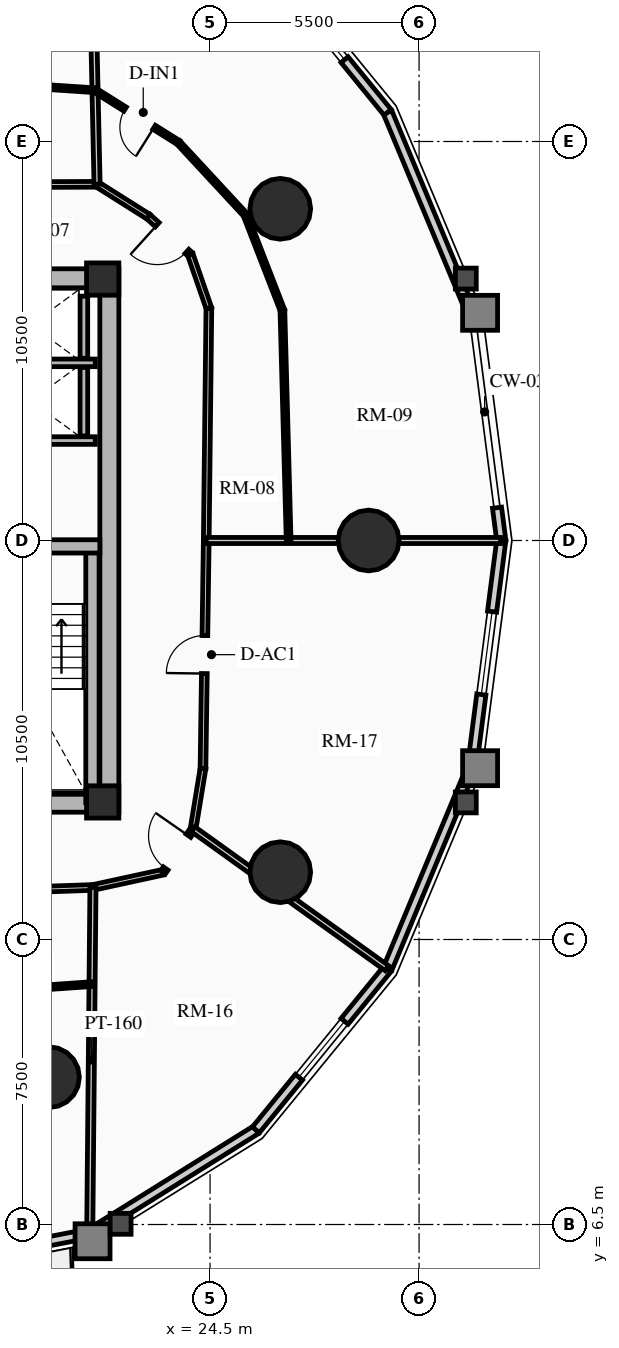
"""IFC4 building model, lengths in metres.
Left out: names, types, materials, properties, quantities, classifications, styles, units other than length and angle.
Written with IfcOpenShell. Run it as: python <this file> out.ifc"""

import sys

from ifc_helpers import new_model, si_unit, direction, frame, frame_2d, origin, origin_2d, place, context, subcontext, project, spatial, rectangle, circle, extrude, source, transform, mapped, element, fill, save


model = new_model("IFC4")
c1 = context("Model", 3, precision=1e-05, world=origin(), true_north=direction((0.0, 1.0)))
c2 = subcontext(c1, "Body", "Model", "MODEL_VIEW")
j1 = project(units=[si_unit("LENGTHUNIT", "METRE"), si_unit("PLANEANGLEUNIT", "RADIAN")], contexts=[c1])
p1 = place(None, origin())
s1 = spatial("IfcSite", under=j1, at=p1, CompositionType="ELEMENT")
p2 = place(p1, origin())
s2 = spatial("IfcBuilding", under=s1, at=p2, CompositionType="ELEMENT")
p3 = place(p2, frame((0.0, 0.0, 56.92)))
s3 = spatial("IfcBuildingStorey", under=s2, at=p3, CompositionType="ELEMENT", Elevation=56.92)
p4 = place(p3, frame((21.85, 17.35, 0.0), z_axis=(0.0, 0.0, 1.0), x_axis=(0.0, 1.0, 0.0)))
e1 = element("IfcWall", 1, at=p4, inside=s3, PredefinedType="SHEAR", context=c2, shape_type="SweptSolid", body=[
    extrude(rectangle(XDim=14.3, YDim=0.5, at=frame_2d((7.15, 0.0))), origin(), (0.0, 0.0, 1.0), 2.91),
])
p5 = place(p3, frame((11.15, 17.6, 0.0), z_axis=(0.0, 0.0, 1.0), x_axis=(1.0, 0.0, 0.0)))
e2 = element("IfcWall", 2, at=p5, inside=s3, PredefinedType="SHEAR", context=c2, shape_type="SweptSolid", body=[
    extrude(rectangle(XDim=10.7, YDim=0.5, at=frame_2d((5.35, 0.0))), origin(), (0.0, 0.0, 1.0), 2.91),
])
m1 = source(origin(), c2, "Body", "SweptSolid", [
    extrude(rectangle(XDim=1.5, YDim=2.02, at=frame_2d((0.75, 1.01))), frame((0.0, 0.26, 0.0), z_axis=(0.0, -1.0, 0.0), x_axis=(1.0, 0.0, 0.0)), (0.0, 0.0, 1.0), 0.52),
])
p6 = place(p5, frame((5.45, 0.0, 0.0)))
e3 = element("IfcOpeningElement", 3, at=p6, cuts=e2, PredefinedType="OPENING", context=c2, shape_type="MappedRepresentation", body=[
    mapped(m1, transform((0.0, 0.0, 0.0), x_axis=(1.0, 0.0, 0.0), y_axis=(0.0, 1.0, 0.0), z_axis=(0.0, 0.0, 1.0), scale=1.0)),
])
p7 = place(p3, frame((11.15, 31.4, 0.0), z_axis=(0.0, 0.0, 1.0), x_axis=(1.0, 0.0, 0.0)))
e4 = element("IfcWall", 4, at=p7, inside=s3, PredefinedType="SHEAR", context=c2, shape_type="SweptSolid", body=[
    extrude(rectangle(XDim=10.7, YDim=0.5, at=frame_2d((5.35, 0.0))), origin(), (0.0, 0.0, 1.0), 2.91),
])
p8 = place(p7, frame((4.6, 0.0, 0.0)))
e5 = element("IfcOpeningElement", 5, at=p8, cuts=e4, PredefinedType="OPENING", context=c2, shape_type="MappedRepresentation", body=[
    mapped(m1, transform((0.0, 0.0, 0.0), x_axis=(1.0, 0.0, 0.0), y_axis=(0.0, 1.0, 0.0), z_axis=(0.0, 0.0, 1.0), scale=1.0)),
])
p9 = place(p3, frame((21.405, 17.6, 0.0), z_axis=(0.0, 0.0, 1.0), x_axis=(0.0, 1.0, 0.0)))
e6 = element("IfcWall", 6, at=p9, inside=s3, PredefinedType="SHEAR", context=c2, shape_type="SweptSolid", body=[
    extrude(rectangle(XDim=6.745, YDim=0.35, at=frame_2d((3.373, 0.0))), origin(), (0.0, 0.0, 1.0), 2.91),
])
p10 = place(p3, frame((18.315, 24.345, 0.0), z_axis=(0.0, 0.0, 1.0), x_axis=(1.0, 0.0, 0.0)))
e7 = element("IfcWall", 7, at=p10, inside=s3, PredefinedType="SHEAR", context=c2, shape_type="SweptSolid", body=[
    extrude(rectangle(XDim=3.285, YDim=0.35, at=frame_2d((1.643, 0.0))), origin(), (0.0, 0.0, 1.0), 2.91),
])
for number, where, z_axis, x_axis in (
    (8, (21.675, 17.62, 0.0), (0.0, 0.0, 1.0), (1.0, 0.0, 0.0)),
    (9, (21.675, 31.38, 0.0), (0.0, 0.0, 1.0), (1.0, 0.0, 0.0)),
):
    element("IfcColumn", number, at=place(p3, frame(where, z_axis=z_axis, x_axis=x_axis)), inside=s3, PredefinedType="COLUMN", context=c2, shape_type="SweptSolid", body=[
        extrude(rectangle(XDim=0.85, YDim=0.85, at=origin_2d()), origin(), (0.0, 0.0, 1.0), 2.91),
    ])
for number, where, z_axis, x_axis in (
    (10, (28.672, 24.5, 0.0), (0.0, 0.0, 1.0), (1.0, 0.0, 0.0)),
    (11, (26.347, 33.229, 0.0), (0.0, 0.0, 1.0), (1.0, 0.0, 0.0)),
    (12, (20.261, 10.377, 0.0), (0.0, 0.0, 1.0), (1.0, 0.0, 0.0)),
    (13, (26.347, 15.771, 0.0), (0.0, 0.0, 1.0), (1.0, 0.0, 0.0)),
):
    element("IfcColumn", number, at=place(p3, frame(where, z_axis=z_axis, x_axis=x_axis)), inside=s3, PredefinedType="USERDEFINED", context=c2, shape_type="SweptSolid", body=[
        extrude(circle(Radius=0.8, at=origin_2d()), origin(), (0.0, 0.0, 1.0), 2.91),
    ])
p11 = place(p3, frame((32.051, 25.363, 0.0), z_axis=(0.0, 0.0, 1.0), x_axis=(0.128523364007, -0.991706481225, 0.0)))
e14 = element("IfcWall", 14, at=p11, inside=s3, PredefinedType="SOLIDWALL", context=c2, shape_type="SweptSolid", body=[
    extrude(rectangle(XDim=0.87, YDim=0.24, at=frame_2d((0.435, 0.0))), origin(), (0.0, 0.0, 1.0), 2.635),
])
p12 = place(p3, frame((29.172, 35.768, 0.0), z_axis=(0.0, 0.0, 1.0), x_axis=(0.384348836956, -0.923187939442, 0.0)))
e15 = element("IfcWall", 15, at=p12, inside=s3, PredefinedType="SOLIDWALL", context=c2, shape_type="SweptSolid", body=[
    extrude(rectangle(XDim=5.789, YDim=0.24, at=frame_2d((2.894, 0.0))), origin(), (0.0, 0.0, 1.0), 2.073),
])
p13 = place(p3, frame((25.707, 40.009, 0.0), z_axis=(0.0, 0.0, 1.0), x_axis=(0.632713287022, -0.77438614168, 0.0)))
e16 = element("IfcWall", 16, at=p13, inside=s3, PredefinedType="SOLIDWALL", context=c2, shape_type="SweptSolid", body=[
    extrude(rectangle(XDim=5.477, YDim=0.24, at=frame_2d((2.738, 0.0))), origin(), (0.0, 0.0, 1.0), 2.073),
])
m2 = source(origin(), c2, "Body", "SweptSolid", [
    extrude(rectangle(XDim=1.9, YDim=1.35, at=frame_2d((0.95, 0.675))), frame((0.0, 0.13, 0.0), z_axis=(0.0, -1.0, 0.0), x_axis=(1.0, 0.0, 0.0)), (0.0, 0.0, 1.0), 0.26),
])
p14 = place(p13, frame((1.788, 0.0, 0.65)))
e17 = element("IfcOpeningElement", 17, at=p14, cuts=e16, PredefinedType="OPENING", context=c2, shape_type="MappedRepresentation", body=[
    mapped(m2, transform((0.0, 0.0, 0.0), x_axis=(1.0, 0.0, 0.0), y_axis=(0.0, 1.0, 0.0), z_axis=(0.0, 0.0, 1.0), scale=1.0)),
])
p15 = place(p3, frame((21.34, 6.268, 0.0), z_axis=(0.0, 0.0, 1.0), x_axis=(-0.981725274071, -0.190303668512, 0.0)))
e18 = element("IfcWall", 18, at=p15, inside=s3, PredefinedType="SOLIDWALL", context=c2, shape_type="SweptSolid", body=[
    extrude(rectangle(XDim=4.93, YDim=0.24, at=frame_2d((2.465, 0.0))), origin(), (0.0, 0.0, 1.0), 2.073),
])
m3 = source(origin(), c2, "Body", "SweptSolid", [
    extrude(rectangle(XDim=1.15, YDim=2.005, at=frame_2d((0.575, 1.002))), frame((0.0, 0.13, 0.0), z_axis=(0.0, -1.0, 0.0), x_axis=(1.0, 0.0, 0.0)), (0.0, 0.0, 1.0), 0.26),
])
p16 = place(p15, frame((1.89, 0.0, 0.0)))
e19 = element("IfcOpeningElement", 19, at=p16, cuts=e18, PredefinedType="OPENING", context=c2, shape_type="MappedRepresentation", body=[
    mapped(m3, transform((0.0, 0.0, 0.0), x_axis=(1.0, 0.0, 0.0), y_axis=(0.0, 1.0, 0.0), z_axis=(0.0, 0.0, 1.0), scale=1.0)),
])
p17 = place(p3, frame((25.707, 8.991, 0.0), z_axis=(0.0, 0.0, 1.0), x_axis=(-0.848533613342, -0.529141481107, 0.0)))
e20 = element("IfcWall", 20, at=p17, inside=s3, PredefinedType="SOLIDWALL", context=c2, shape_type="SweptSolid", body=[
    extrude(rectangle(XDim=5.146, YDim=0.24, at=frame_2d((2.573, 0.0))), origin(), (0.0, 0.0, 1.0), 2.073),
])
p18 = place(p3, frame((29.172, 13.232, 0.0), z_axis=(0.0, 0.0, 1.0), x_axis=(-0.632713287022, -0.77438614168, 0.0)))
e21 = element("IfcWall", 21, at=p18, inside=s3, PredefinedType="SOLIDWALL", context=c2, shape_type="SweptSolid", body=[
    extrude(rectangle(XDim=5.477, YDim=0.24, at=frame_2d((2.738, 0.0))), origin(), (0.0, 0.0, 1.0), 2.073),
])
p19 = place(p18, frame((1.788, 0.0, 0.65)))
e22 = element("IfcOpeningElement", 22, at=p19, cuts=e21, PredefinedType="OPENING", context=c2, shape_type="MappedRepresentation", body=[
    mapped(m2, transform((0.0, 0.0, 0.0), x_axis=(1.0, 0.0, 0.0), y_axis=(0.0, 1.0, 0.0), z_axis=(0.0, 0.0, 1.0), scale=1.0)),
])
p20 = place(p3, frame((31.396, 18.576, 0.0), z_axis=(0.0, 0.0, 1.0), x_axis=(-0.384348836956, -0.923187939442, 0.0)))
e23 = element("IfcWall", 23, at=p20, inside=s3, PredefinedType="SOLIDWALL", context=c2, shape_type="SweptSolid", body=[
    extrude(rectangle(XDim=5.789, YDim=0.24, at=frame_2d((2.894, 0.0))), origin(), (0.0, 0.0, 1.0), 2.073),
])
p21 = place(p3, frame((32.163, 24.5, 0.0), z_axis=(0.0, 0.0, 1.0), x_axis=(-0.128339641463, -0.991730274031, 0.0)))
e24 = element("IfcWall", 24, at=p21, inside=s3, PredefinedType="SOLIDWALL", context=c2, shape_type="SweptSolid", body=[
    extrude(rectangle(XDim=5.973, YDim=0.24, at=frame_2d((2.987, 0.0))), origin(), (0.0, 0.0, 1.0), 2.073),
])
m4 = source(origin(), c2, "Body", "SweptSolid", [
    extrude(rectangle(XDim=2.2, YDim=1.35, at=frame_2d((1.1, 0.675))), frame((0.0, 0.13, 0.0), z_axis=(0.0, -1.0, 0.0), x_axis=(1.0, 0.0, 0.0)), (0.0, 0.0, 1.0), 0.26),
])
p22 = place(p21, frame((1.887, 0.0, 0.65)))
e25 = element("IfcOpeningElement", 25, at=p22, cuts=e24, PredefinedType="OPENING", context=c2, shape_type="MappedRepresentation", body=[
    mapped(m4, transform((0.0, 0.0, 0.0), x_axis=(1.0, 0.0, 0.0), y_axis=(0.0, 1.0, 0.0), z_axis=(0.0, 0.0, 1.0), scale=1.0)),
])
for number, where, z_axis, x_axis in (
    (26, (18.51, 27.13, 0.0), (0.0, 0.0, 1.0), (1.0, 0.0, 0.0)),
    (27, (18.51, 29.175, 0.0), (0.0, 0.0, 1.0), (1.0, 0.0, 0.0)),
):
    element("IfcWall", number, at=place(p3, frame(where, z_axis=z_axis, x_axis=x_axis)), inside=s3, PredefinedType="SHEAR", context=c2, shape_type="SweptSolid", body=[
        extrude(rectangle(XDim=2.97, YDim=0.2, at=frame_2d((1.485, 0.0))), origin(), (0.0, 0.0, 1.0), 2.91),
    ])
p23 = place(p3, frame((21.18, 27.25, 0.0), z_axis=(0.0, 0.0, 1.0), x_axis=(0.0, 1.0, 0.0)))
e28 = element("IfcWall", 28, at=p23, inside=s3, PredefinedType="SHEAR", context=c2, shape_type="SweptSolid", body=[
    extrude(rectangle(XDim=1.805, YDim=0.2, at=frame_2d((0.902, 0.0))), origin(), (0.0, 0.0, 1.0), 2.91),
])
p24 = place(p3, frame((21.18, 29.295, 0.0), z_axis=(0.0, 0.0, 1.0), x_axis=(0.0, 1.0, 0.0)))
e29 = element("IfcWall", 29, at=p24, inside=s3, PredefinedType="SHEAR", context=c2, shape_type="SweptSolid", body=[
    extrude(rectangle(XDim=1.635, YDim=0.2, at=frame_2d((0.817, 0.0))), origin(), (0.0, 0.0, 1.0), 2.91),
])
p25 = place(p3, frame((24.4, 24.5, 0.0), z_axis=(0.0, 0.0, 1.0), x_axis=(0.011299841544, 0.999936154752, 0.0)))
e30 = element("IfcWall", 30, at=p25, inside=s3, PredefinedType="PARTITIONING", context=c2, shape_type="SweptSolid", body=[
    extrude(rectangle(XDim=6.115, YDim=0.15, at=frame_2d((3.057, 0.0))), origin(), (0.0, 0.0, 1.0), 2.159),
])
p26 = place(p3, frame((24.469, 30.614, 0.0), z_axis=(0.0, 0.0, 1.0), x_axis=(-0.327228335485, 0.944945298129, 0.0)))
e31 = element("IfcWall", 31, at=p26, inside=s3, PredefinedType="PARTITIONING", context=c2, shape_type="SweptSolid", body=[
    extrude(rectangle(XDim=1.495, YDim=0.15, at=frame_2d((0.748, 0.0))), origin(), (0.0, 0.0, 1.0), 2.205),
])
p27 = place(p3, frame((23.98, 32.027, 0.0), z_axis=(0.0, 0.0, 1.0), x_axis=(-0.742353224332, 0.670008724065, 0.0)))
e32 = element("IfcWall", 32, at=p27, inside=s3, PredefinedType="PARTITIONING", context=c2, shape_type="SweptSolid", body=[
    extrude(rectangle(XDim=1.485, YDim=0.15, at=frame_2d((0.742, 0.0))), origin(), (0.0, 0.0, 1.0), 2.159),
])
m5 = source(origin(), c2, "Body", "SweptSolid", [
    extrude(rectangle(XDim=1.05, YDim=2.015, at=frame_2d((0.525, 1.007))), frame((0.0, 0.085, 0.0), z_axis=(0.0, -1.0, 0.0), x_axis=(1.0, 0.0, 0.0)), (0.0, 0.0, 1.0), 0.17),
])
p28 = place(p27, frame((0.12, 0.0, 0.0)))
e33 = element("IfcOpeningElement", 33, at=p28, cuts=e32, PredefinedType="OPENING", context=c2, shape_type="MappedRepresentation", body=[
    mapped(m5, transform((0.0, 0.0, 0.0), x_axis=(1.0, 0.0, 0.0), y_axis=(0.0, 1.0, 0.0), z_axis=(0.0, 0.0, 1.0), scale=1.0)),
])
p29 = place(p3, frame((22.877, 33.022, 0.0), z_axis=(0.0, 0.0, 1.0), x_axis=(-0.845895608855, 0.533348496689, 0.0)))
e34 = element("IfcWall", 34, at=p29, inside=s3, PredefinedType="PARTITIONING", context=c2, shape_type="SweptSolid", body=[
    extrude(rectangle(XDim=1.597, YDim=0.15, at=frame_2d((0.798, 0.0))), origin(), (0.0, 0.0, 1.0), 2.205),
])
p30 = place(p3, frame((21.527, 33.873, 0.0), z_axis=(0.0, 0.0, 1.0), x_axis=(-0.999991838845, -0.004040079574, 0.0)))
e35 = element("IfcWall", 35, at=p30, inside=s3, PredefinedType="PARTITIONING", context=c2, shape_type="SweptSolid", body=[
    extrude(rectangle(XDim=3.384, YDim=0.15, at=frame_2d((1.692, 0.0))), origin(), (0.0, 0.0, 1.0), 2.159),
])
p31 = place(p3, frame((14.781, 15.141, 0.0), z_axis=(0.0, 0.0, 1.0), x_axis=(0.999407918707, 0.034406569513, 0.0)))
e36 = element("IfcWall", 36, at=p31, inside=s3, PredefinedType="PARTITIONING", context=c2, shape_type="SweptSolid", body=[
    extrude(rectangle(XDim=6.642, YDim=0.15, at=frame_2d((3.321, 0.0))), origin(), (0.0, 0.0, 1.0), 2.159),
])
p32 = place(p3, frame((21.419, 15.369, 0.0), z_axis=(0.0, 0.0, 1.0), x_axis=(0.977192701953, 0.212354475464, 0.0)))
e37 = element("IfcWall", 37, at=p32, inside=s3, PredefinedType="PARTITIONING", context=c2, shape_type="SweptSolid", body=[
    extrude(rectangle(XDim=1.888, YDim=0.15, at=frame_2d((0.944, 0.0))), origin(), (0.0, 0.0, 1.0), 2.205),
])
p33 = place(p3, frame((23.263, 15.77, 0.0), z_axis=(0.0, 0.0, 1.0), x_axis=(0.570743456919, 0.821128434768, 0.0)))
e38 = element("IfcWall", 38, at=p33, inside=s3, PredefinedType="PARTITIONING", context=c2, shape_type="SweptSolid", body=[
    extrude(rectangle(XDim=1.382, YDim=0.15, at=frame_2d((0.691, 0.0))), origin(), (0.0, 0.0, 1.0), 2.159),
])
p34 = place(p33, frame((0.12, 0.0, 0.0)))
e39 = element("IfcOpeningElement", 39, at=p34, cuts=e38, PredefinedType="OPENING", context=c2, shape_type="MappedRepresentation", body=[
    mapped(m5, transform((0.0, 0.0, 0.0), x_axis=(1.0, 0.0, 0.0), y_axis=(0.0, 1.0, 0.0), z_axis=(0.0, 0.0, 1.0), scale=1.0)),
])
p35 = place(p3, frame((24.052, 16.905, 0.0), z_axis=(0.0, 0.0, 1.0), x_axis=(0.162091534225, 0.986775726562, 0.0)))
e40 = element("IfcWall", 40, at=p35, inside=s3, PredefinedType="PARTITIONING", context=c2, shape_type="SweptSolid", body=[
    extrude(rectangle(XDim=1.613, YDim=0.15, at=frame_2d((0.807, 0.0))), origin(), (0.0, 0.0, 1.0), 2.205),
])
p36 = place(p3, frame((24.313, 18.496, 0.0), z_axis=(0.0, 0.0, 1.0), x_axis=(0.014394019188, 0.999896400739, 0.0)))
e41 = element("IfcWall", 41, at=p36, inside=s3, PredefinedType="PARTITIONING", context=c2, shape_type="SweptSolid", body=[
    extrude(rectangle(XDim=6.004, YDim=0.15, at=frame_2d((3.002, 0.0))), origin(), (0.0, 0.0, 1.0), 2.635),
])
m6 = source(origin(), c2, "Body", "SweptSolid", [
    extrude(rectangle(XDim=1.0, YDim=2.015, at=frame_2d((0.5, 1.007))), frame((0.0, 0.085, 0.0), z_axis=(0.0, -1.0, 0.0), x_axis=(1.0, 0.0, 0.0)), (0.0, 0.0, 1.0), 0.17),
])
p37 = place(p36, frame((2.502, 0.0, 0.0)))
e42 = element("IfcOpeningElement", 42, at=p37, cuts=e41, PredefinedType="OPENING", context=c2, shape_type="MappedRepresentation", body=[
    mapped(m6, transform((0.0, 0.0, 0.0), x_axis=(1.0, 0.0, 0.0), y_axis=(0.0, 1.0, 0.0), z_axis=(0.0, 0.0, 1.0), scale=1.0)),
])
p38 = place(p3, frame((24.4, 24.5, 0.0), z_axis=(0.0, 0.0, 1.0), x_axis=(1.0, 0.0, 0.0)))
e43 = element("IfcWall", 43, at=p38, inside=s3, PredefinedType="PARTITIONING", context=c2, shape_type="SweptSolid", body=[
    extrude(rectangle(XDim=7.743, YDim=0.16, at=frame_2d((3.872, 0.0))), origin(), (0.0, 0.0, 1.0), 2.073),
])
p39 = place(p3, frame((21.527, 33.873, 0.0), z_axis=(0.0, 0.0, 1.0), x_axis=(-0.021814395676, 0.999762037758, 0.0)))
e44 = element("IfcWall", 44, at=p39, inside=s3, PredefinedType="PARTITIONING", context=c2, shape_type="SweptSolid", body=[
    extrude(rectangle(XDim=8.842, YDim=0.16, at=frame_2d((4.421, 0.0))), origin(), (0.0, 0.0, 1.0), 2.073),
])
p40 = place(p3, frame((21.419, 15.369, 0.0), z_axis=(0.0, 0.0, 1.0), x_axis=(-0.009327801925, -0.999956495109, 0.0)))
e45 = element("IfcWall", 45, at=p40, inside=s3, PredefinedType="PARTITIONING", context=c2, shape_type="SweptSolid", body=[
    extrude(rectangle(XDim=9.082, YDim=0.16, at=frame_2d((4.541, 0.0))), origin(), (0.0, 0.0, 1.0), 2.073),
])
p41 = place(p3, frame((24.052, 16.905, 0.0), z_axis=(0.0, 0.0, 1.0), x_axis=(0.812581474608, -0.582847619129, 0.0)))
e46 = element("IfcWall", 46, at=p41, inside=s3, PredefinedType="PARTITIONING", context=c2, shape_type="SweptSolid", body=[
    extrude(rectangle(XDim=6.281, YDim=0.16, at=frame_2d((3.14, 0.0))), origin(), (0.0, 0.0, 1.0), 2.073),
])
p42 = place(p3, frame((26.568, 24.5, 0.0), z_axis=(0.0, 0.0, 1.0), x_axis=(-0.027187947422, 0.999630339433, 0.0)))
e47 = element("IfcWall", 47, at=p42, inside=s3, PredefinedType="PARTITIONING", context=c2, shape_type="SweptSolid", body=[
    extrude(rectangle(XDim=6.061, YDim=0.125, at=frame_2d((3.031, 0.0))), origin(), (0.0, 0.0, 1.0), 2.159),
])
p43 = place(p3, frame((26.403, 30.559, 0.0), z_axis=(0.0, 0.0, 1.0), x_axis=(-0.361637165216, 0.932318915787, 0.0)))
e48 = element("IfcWall", 48, at=p43, inside=s3, PredefinedType="PARTITIONING", context=c2, shape_type="SweptSolid", body=[
    extrude(rectangle(XDim=2.694, YDim=0.125, at=frame_2d((1.347, 0.0))), origin(), (0.0, 0.0, 1.0), 2.159),
])
p44 = place(p3, frame((25.429, 33.071, 0.0), z_axis=(0.0, 0.0, 1.0), x_axis=(-0.679623863187, 0.733560770889, 0.0)))
e49 = element("IfcWall", 49, at=p44, inside=s3, PredefinedType="PARTITIONING", context=c2, shape_type="SweptSolid", body=[
    extrude(rectangle(XDim=2.594, YDim=0.125, at=frame_2d((1.297, 0.0))), origin(), (0.0, 0.0, 1.0), 2.635),
])
p45 = place(p3, frame((23.666, 34.974, 0.0), z_axis=(0.0, 0.0, 1.0), x_axis=(-0.847319394731, 0.531083650014, 0.0)))
e50 = element("IfcWall", 50, at=p45, inside=s3, PredefinedType="PARTITIONING", context=c2, shape_type="SweptSolid", body=[
    extrude(rectangle(XDim=2.589, YDim=0.125, at=frame_2d((1.294, 0.0))), origin(), (0.0, 0.0, 1.0), 2.205),
])
m7 = source(origin(), c2, "Body", "SweptSolid", [
    extrude(rectangle(XDim=0.9, YDim=2.005, at=frame_2d((0.45, 1.002))), frame((0.0, 0.073, 0.0), z_axis=(0.0, -1.0, 0.0), x_axis=(1.0, 0.0, 0.0)), (0.0, 0.0, 1.0), 0.145),
])
p46 = place(p45, frame((0.754, 0.0, 0.0)))
e51 = element("IfcOpeningElement", 51, at=p46, cuts=e50, PredefinedType="OPENING", context=c2, shape_type="MappedRepresentation", body=[
    mapped(m7, transform((0.0, 0.0, 0.0), x_axis=(1.0, 0.0, 0.0), y_axis=(0.0, 1.0, 0.0), z_axis=(0.0, 0.0, 1.0), scale=1.0)),
])
p47 = place(p3, frame((21.473, 36.348, 0.0), z_axis=(0.0, 0.0, 1.0), x_axis=(-0.997789137643, 0.066459286803, 0.0)))
e52 = element("IfcWall", 52, at=p47, inside=s3, PredefinedType="PARTITIONING", context=c2, shape_type="SweptSolid", body=[
    extrude(rectangle(XDim=3.798, YDim=0.125, at=frame_2d((1.899, 0.0))), origin(), (0.0, 0.0, 1.0), 2.159),
])
p48 = place(p3, frame((15.262, 12.399, 0.0), z_axis=(0.0, 0.0, 1.0), x_axis=(0.997584901562, 0.069457643027, 0.0)))
e53 = element("IfcWall", 53, at=p48, inside=s3, PredefinedType="PARTITIONING", context=c2, shape_type="SweptSolid", body=[
    extrude(rectangle(XDim=6.148, YDim=0.125, at=frame_2d((3.074, 0.0))), origin(), (0.0, 0.0, 1.0), 2.159),
])
p49 = place(p48, frame((1.372, 0.0, 0.0)))
e54 = element("IfcOpeningElement", 54, at=p49, cuts=e53, PredefinedType="OPENING", context=c2, shape_type="MappedRepresentation", body=[
    mapped(m7, transform((0.0, 0.0, 0.0), x_axis=(1.0, 0.0, 0.0), y_axis=(0.0, 1.0, 0.0), z_axis=(0.0, 0.0, 1.0), scale=1.0)),
])
m8 = source(origin(), c2, "Body", "SweptSolid", [
    extrude(rectangle(XDim=1.9, YDim=1.35, at=frame_2d((0.95, 0.675))), frame((0.0, 0.03, 0.0), z_axis=(0.0, -1.0, 0.0), x_axis=(1.0, 0.0, 0.0)), (0.0, 0.0, 1.0), 0.06),
])
p50 = place(p14, origin())
e55 = element("IfcWindow", 55, at=p50, inside=s3, PartitioningType="DOUBLE_PANEL_VERTICAL", PredefinedType="WINDOW", context=c2, shape_type="MappedRepresentation", body=[
    mapped(m8, transform((0.0, 0.0, 0.0), x_axis=(1.0, 0.0, 0.0), y_axis=(0.0, 1.0, 0.0), z_axis=(0.0, 0.0, 1.0), scale=1.0)),
])
fill(e17, e55)
p51 = place(p19, origin())
e56 = element("IfcWindow", 56, at=p51, inside=s3, PartitioningType="DOUBLE_PANEL_VERTICAL", PredefinedType="WINDOW", context=c2, shape_type="MappedRepresentation", body=[
    mapped(m8, transform((0.0, 0.0, 0.0), x_axis=(1.0, 0.0, 0.0), y_axis=(0.0, 1.0, 0.0), z_axis=(0.0, 0.0, 1.0), scale=1.0)),
])
fill(e22, e56)
m9 = source(origin(), c2, "Body", "SweptSolid", [
    extrude(rectangle(XDim=2.2, YDim=1.35, at=frame_2d((1.1, 0.675))), frame((0.0, 0.03, 0.0), z_axis=(0.0, -1.0, 0.0), x_axis=(1.0, 0.0, 0.0)), (0.0, 0.0, 1.0), 0.06),
])
p52 = place(p22, origin())
e57 = element("IfcWindow", 57, at=p52, inside=s3, PartitioningType="DOUBLE_PANEL_VERTICAL", PredefinedType="WINDOW", context=c2, shape_type="MappedRepresentation", body=[
    mapped(m9, transform((0.0, 0.0, 0.0), x_axis=(1.0, 0.0, 0.0), y_axis=(0.0, 1.0, 0.0), z_axis=(0.0, 0.0, 1.0), scale=1.0)),
])
fill(e25, e57)
m10 = source(origin(), c2, "Body", "SweptSolid", [
    extrude(rectangle(XDim=1.05, YDim=2.015, at=frame_2d((0.525, 1.007))), frame((0.0, 0.025, 0.0), z_axis=(0.0, -1.0, 0.0), x_axis=(1.0, 0.0, 0.0)), (0.0, 0.0, 1.0), 0.05),
])
p53 = place(p28, origin())
e58 = element("IfcDoor", 58, at=p53, inside=s3, OperationType="SINGLE_SWING_RIGHT", PredefinedType="DOOR", context=c2, shape_type="MappedRepresentation", body=[
    mapped(m10, transform((0.0, 0.0, 0.0), x_axis=(1.0, 0.0, 0.0), y_axis=(0.0, 1.0, 0.0), z_axis=(0.0, 0.0, 1.0), scale=1.0)),
])
fill(e33, e58)
m11 = source(origin(), c2, "Body", "SweptSolid", [
    extrude(rectangle(XDim=0.9, YDim=2.005, at=frame_2d((0.45, 1.002))), frame((0.0, 0.025, 0.0), z_axis=(0.0, -1.0, 0.0), x_axis=(1.0, 0.0, 0.0)), (0.0, 0.0, 1.0), 0.05),
])
p54 = place(p46, origin())
e59 = element("IfcDoor", 59, at=p54, inside=s3, OperationType="SINGLE_SWING_LEFT", PredefinedType="DOOR", context=c2, shape_type="MappedRepresentation", body=[
    mapped(m11, transform((0.0, 0.0, 0.0), x_axis=(1.0, 0.0, 0.0), y_axis=(0.0, 1.0, 0.0), z_axis=(0.0, 0.0, 1.0), scale=1.0)),
])
fill(e51, e59)
p55 = place(p34, origin())
e60 = element("IfcDoor", 60, at=p55, inside=s3, OperationType="SINGLE_SWING_RIGHT", PredefinedType="DOOR", context=c2, shape_type="MappedRepresentation", body=[
    mapped(m10, transform((0.0, 0.0, 0.0), x_axis=(1.0, 0.0, 0.0), y_axis=(0.0, 1.0, 0.0), z_axis=(0.0, 0.0, 1.0), scale=1.0)),
])
fill(e39, e60)
m12 = source(origin(), c2, "Body", "SweptSolid", [
    extrude(rectangle(XDim=1.0, YDim=2.015, at=frame_2d((0.5, 1.007))), frame((0.0, 0.025, 0.0), z_axis=(0.0, -1.0, 0.0), x_axis=(1.0, 0.0, 0.0)), (0.0, 0.0, 1.0), 0.05),
])
p56 = place(p37, origin())
e61 = element("IfcDoor", 61, at=p56, inside=s3, OperationType="SINGLE_SWING_LEFT", PredefinedType="DOOR", context=c2, shape_type="MappedRepresentation", body=[
    mapped(m12, transform((0.0, 0.0, 0.0), x_axis=(1.0, 0.0, 0.0), y_axis=(0.0, 1.0, 0.0), z_axis=(0.0, 0.0, 1.0), scale=1.0)),
])
fill(e42, e61)
save(model, sys.argv[1])
